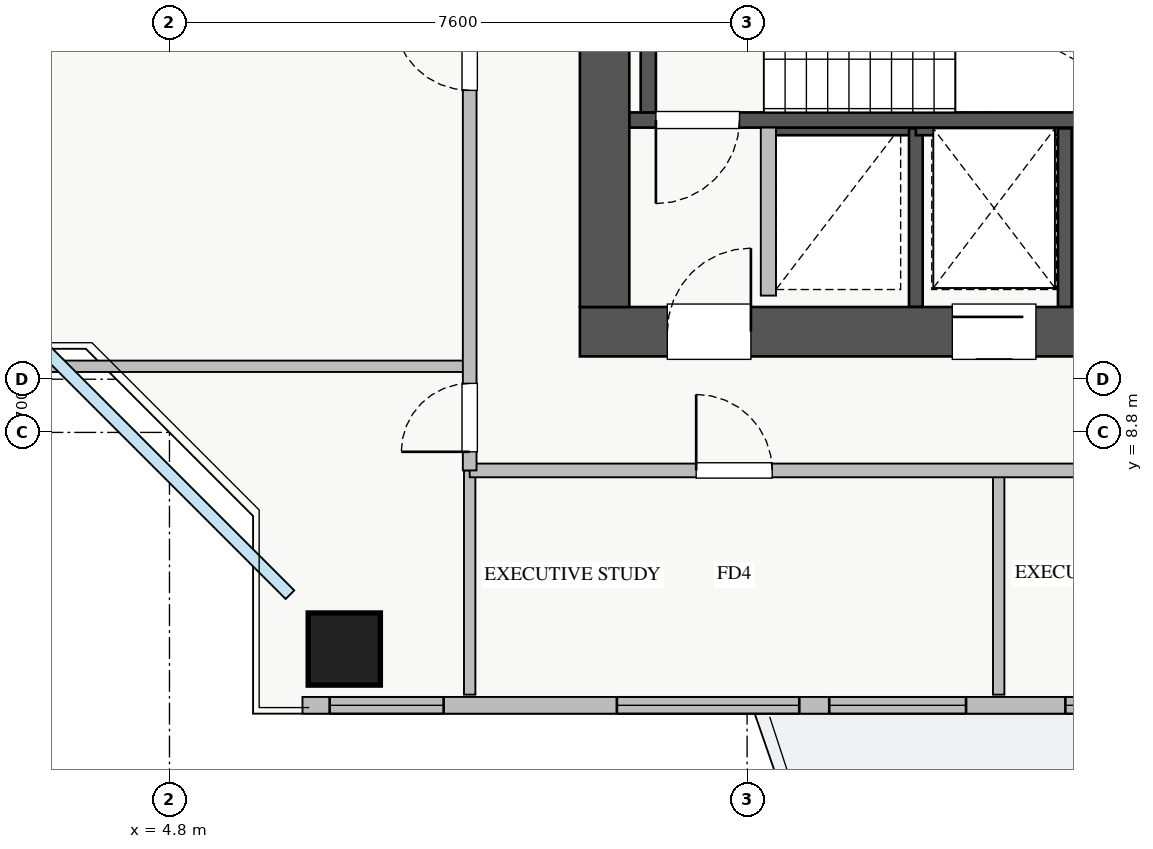
"""IFC4 building model, lengths in metres.
Left out: names, types, materials, properties, quantities, classifications, styles, units other than length and angle.
Written with IfcOpenShell. Run it as: python <this file> out.ifc"""

import sys

from ifc_helpers import new_model, si_unit, direction, frame, frame_2d, origin, origin_2d, place, context, subcontext, project, spatial, rectangle, extrude, source, transform, mapped, element, fill, save


model = new_model("IFC4")
c1 = context("Model", 3, precision=1e-05, world=origin(), true_north=direction((0.0, 1.0)))
c2 = subcontext(c1, "Body", "Model", "MODEL_VIEW")
j1 = project(units=[si_unit("LENGTHUNIT", "METRE"), si_unit("PLANEANGLEUNIT", "RADIAN")], contexts=[c1])
p1 = place(None, origin())
s1 = spatial("IfcSite", under=j1, at=p1, CompositionType="ELEMENT")
p2 = place(p1, origin())
s2 = spatial("IfcBuilding", under=s1, at=p2, CompositionType="ELEMENT")
p3 = place(p2, frame((0.0, 0.0, 147.0)))
s3 = spatial("IfcBuildingStorey", under=s2, at=p3, CompositionType="ELEMENT", Elevation=147.0)
p4 = place(p3, frame((12.68, 12.8, 0.0), z_axis=(0.0, 0.0, 1.0), x_axis=(1.0, 0.0, 0.0)))
e1 = element("IfcWall", 1, at=p4, inside=s3, PredefinedType="SHEAR", context=c2, shape_type="SweptSolid", body=[
    extrude(rectangle(XDim=1.94, YDim=0.18, at=frame_2d((0.97, 0.0))), origin(), (0.0, 0.0, 1.0), 3.07),
])
p5 = place(p3, frame((14.62, 10.45, 0.0), z_axis=(0.0, 0.0, 1.0), x_axis=(0.0, 1.0, 0.0)))
e2 = element("IfcWall", 2, at=p5, inside=s3, PredefinedType="SHEAR", context=c2, shape_type="SweptSolid", body=[
    extrude(rectangle(XDim=2.35, YDim=0.18, at=frame_2d((1.175, 0.0))), origin(), (0.0, 0.0, 1.0), 3.07),
])
p6 = place(p3, frame((14.62, 12.8, 0.0), z_axis=(0.0, 0.0, 1.0), x_axis=(1.0, 0.0, 0.0)))
e3 = element("IfcWall", 3, at=p6, inside=s3, PredefinedType="SHEAR", context=c2, shape_type="SweptSolid", body=[
    extrude(rectangle(XDim=1.96, YDim=0.18, at=frame_2d((0.98, 0.0))), origin(), (0.0, 0.0, 1.0), 3.07),
])
p7 = place(p3, frame((16.58, 10.45, 0.0), z_axis=(0.0, 0.0, 1.0), x_axis=(0.0, 1.0, 0.0)))
e4 = element("IfcWall", 4, at=p7, inside=s3, PredefinedType="SHEAR", context=c2, shape_type="SweptSolid", body=[
    extrude(rectangle(XDim=2.35, YDim=0.18, at=frame_2d((1.175, 0.0))), origin(), (0.0, 0.0, 1.0), 3.07),
])
p8 = place(p3, frame((10.85, 12.91, 0.0), z_axis=(0.0, 0.0, 1.0), x_axis=(1.0, 0.0, 0.0)))
e5 = element("IfcWall", 5, at=p8, inside=s3, PredefinedType="SHEAR", context=c2, shape_type="SweptSolid", body=[
    extrude(rectangle(XDim=7.3, YDim=0.2, at=frame_2d((3.65, 0.0))), origin(), (0.0, 0.0, 1.0), 3.25),
])
p9 = place(p8, frame((0.35, 0.0, 0.0)))
e6 = element("IfcOpeningElement", 6, at=p9, cuts=e5, PredefinedType="OPENING", context=c2, shape_type="SweptSolid", body=[
    extrude(rectangle(XDim=1.1, YDim=2.05, at=frame_2d((0.55, 1.025))), frame((0.0, 0.11, 0.0), z_axis=(0.0, -1.0, 0.0), x_axis=(1.0, 0.0, 0.0)), (0.0, 0.0, 1.0), 0.22),
])
p10 = place(p3, frame((11.1, 13.01, 0.0), z_axis=(0.0, 0.0, 1.0), x_axis=(0.0, 1.0, 0.0)))
e7 = element("IfcWall", 7, at=p10, inside=s3, PredefinedType="SHEAR", context=c2, shape_type="SweptSolid", body=[
    extrude(rectangle(XDim=2.94, YDim=0.2, at=frame_2d((1.47, 0.0))), origin(), (0.0, 0.0, 1.0), 3.25),
])
p11 = place(p3, frame((10.2, 10.125, 0.0), z_axis=(0.0, 0.0, 1.0), x_axis=(1.0, 0.0, 0.0)))
e8 = element("IfcWall", 8, at=p11, inside=s3, PredefinedType="SHEAR", context=c2, shape_type="SweptSolid", body=[
    extrude(rectangle(XDim=17.6, YDim=0.65, at=frame_2d((8.8, 0.0))), origin(), (0.0, 0.0, 1.0), 3.25),
])
p12 = place(p11, frame((1.15, 0.0, 0.0)))
e9 = element("IfcOpeningElement", 9, at=p12, cuts=e8, PredefinedType="OPENING", context=c2, shape_type="SweptSolid", body=[
    extrude(rectangle(XDim=1.1, YDim=2.05, at=frame_2d((0.55, 1.025))), frame((0.0, 0.335, 0.0), z_axis=(0.0, -1.0, 0.0), x_axis=(1.0, 0.0, 0.0)), (0.0, 0.0, 1.0), 0.67),
])
p13 = place(p11, frame((8.3, 0.0, 0.0)))
e10 = element("IfcOpeningElement", 10, at=p13, cuts=e8, PredefinedType="OPENING", context=c2, shape_type="SweptSolid", body=[
    extrude(rectangle(XDim=1.1, YDim=2.05, at=frame_2d((0.55, 1.025))), frame((0.0, 0.335, 0.0), z_axis=(0.0, -1.0, 0.0), x_axis=(1.0, 0.0, 0.0)), (0.0, 0.0, 1.0), 0.67),
])
p14 = place(p11, frame((4.9, 0.0, 0.0)))
e11 = element("IfcOpeningElement", 11, at=p14, cuts=e8, PredefinedType="OPENING", context=c2, shape_type="SweptSolid", body=[
    extrude(rectangle(XDim=1.1, YDim=2.05, at=frame_2d((0.55, 1.025))), frame((0.0, 0.335, 0.0), z_axis=(0.0, -1.0, 0.0), x_axis=(1.0, 0.0, 0.0)), (0.0, 0.0, 1.0), 0.67),
])
p15 = place(p11, frame((14.74, 0.0, 0.0)))
e12 = element("IfcOpeningElement", 12, at=p15, cuts=e8, PredefinedType="OPENING", context=c2, shape_type="SweptSolid", body=[
    extrude(rectangle(XDim=1.0, YDim=2.05, at=frame_2d((0.5, 1.025))), frame((0.0, 0.335, 0.0), z_axis=(0.0, -1.0, 0.0), x_axis=(1.0, 0.0, 0.0)), (0.0, 0.0, 1.0), 0.67),
])
p16 = place(p11, frame((11.67, 0.0, 0.0)))
e13 = element("IfcOpeningElement", 13, at=p16, cuts=e8, PredefinedType="OPENING", context=c2, shape_type="SweptSolid", body=[
    extrude(rectangle(XDim=1.0, YDim=2.05, at=frame_2d((0.5, 1.025))), frame((0.0, 0.335, 0.0), z_axis=(0.0, -1.0, 0.0), x_axis=(1.0, 0.0, 0.0)), (0.0, 0.0, 1.0), 0.67),
])
p17 = place(p3, frame((10.525, 10.45, 0.0), z_axis=(0.0, 0.0, 1.0), x_axis=(0.0, 1.0, 0.0)))
e14 = element("IfcWall", 14, at=p17, inside=s3, PredefinedType="SHEAR", context=c2, shape_type="SweptSolid", body=[
    extrude(rectangle(XDim=5.9, YDim=0.65, at=frame_2d((2.95, 0.0))), origin(), (0.0, 0.0, 1.0), 3.25),
])
m1 = source(origin(), c2, "Body", "SweptSolid", [
    extrude(rectangle(XDim=0.95, YDim=0.95, at=origin_2d()), origin(), (0.0, 0.0, 1.0), 3.25),
])
p18 = place(p3, frame((7.1, 5.95, 0.0), z_axis=(0.0, 0.0, 1.0), x_axis=(1.0, 0.0, 0.0)))
e15 = element("IfcColumn", 15, at=p18, inside=s3, PredefinedType="COLUMN", context=c2, shape_type="MappedRepresentation", body=[
    mapped(m1, transform((0.0, 0.0, 0.0), x_axis=(1.0, 0.0, 0.0), y_axis=(0.0, 1.0, 0.0), z_axis=(0.0, 0.0, 1.0), scale=1.0)),
])
p19 = place(p3, frame((6.55, 5.21, 0.0), z_axis=(0.0, 0.0, 1.0), x_axis=(1.0, 0.0, 0.0)))
e16 = element("IfcWall", 16, at=p19, inside=s3, PredefinedType="STANDARD", context=c2, shape_type="SweptSolid", body=[
    extrude(rectangle(XDim=24.9, YDim=0.22, at=frame_2d((12.45, 0.0))), origin(), (0.0, 0.0, 1.0), 2.61),
])
p20 = place(p19, frame((13.3, 0.0, 0.0)))
e17 = element("IfcOpeningElement", 17, at=p20, cuts=e16, PredefinedType="OPENING", context=c2, shape_type="SweptSolid", body=[
    extrude(rectangle(XDim=1.2, YDim=2.1, at=frame_2d((0.6, 1.05))), frame((0.0, 0.12, 0.0), z_axis=(0.0, -1.0, 0.0), x_axis=(1.0, 0.0, 0.0)), (0.0, 0.0, 1.0), 0.24),
])
p21 = place(p19, frame((0.357, 0.0, 0.9)))
e18 = element("IfcOpeningElement", 18, at=p21, cuts=e16, PredefinedType="OPENING", context=c2, shape_type="SweptSolid", body=[
    extrude(rectangle(XDim=1.5, YDim=1.5, at=frame_2d((0.75, 0.75))), frame((0.0, 0.12, 0.0), z_axis=(0.0, -1.0, 0.0), x_axis=(1.0, 0.0, 0.0)), (0.0, 0.0, 1.0), 0.24),
])
p22 = place(p19, frame((6.931, 0.0, 0.9)))
e19 = element("IfcOpeningElement", 19, at=p22, cuts=e16, PredefinedType="OPENING", context=c2, shape_type="SweptSolid", body=[
    extrude(rectangle(XDim=1.8, YDim=1.5, at=frame_2d((0.9, 0.75))), frame((0.0, 0.12, 0.0), z_axis=(0.0, -1.0, 0.0), x_axis=(1.0, 0.0, 0.0)), (0.0, 0.0, 1.0), 0.24),
])
p23 = place(p19, frame((14.813, 0.0, 0.9)))
e20 = element("IfcOpeningElement", 20, at=p23, cuts=e16, PredefinedType="OPENING", context=c2, shape_type="SweptSolid", body=[
    extrude(rectangle(XDim=1.5, YDim=1.45, at=frame_2d((0.75, 0.725))), frame((0.0, 0.12, 0.0), z_axis=(0.0, -1.0, 0.0), x_axis=(1.0, 0.0, 0.0)), (0.0, 0.0, 1.0), 0.24),
])
p24 = place(p19, frame((20.738, 0.0, 0.9)))
e21 = element("IfcOpeningElement", 21, at=p24, cuts=e16, PredefinedType="OPENING", context=c2, shape_type="SweptSolid", body=[
    extrude(rectangle(XDim=2.1, YDim=1.48, at=frame_2d((1.05, 0.74))), frame((0.0, 0.12, 0.0), z_axis=(0.0, -1.0, 0.0), x_axis=(1.0, 0.0, 0.0)), (0.0, 0.0, 1.0), 0.24),
])
p25 = place(p19, frame((4.136, 0.0, 0.9)))
e22 = element("IfcOpeningElement", 22, at=p25, cuts=e16, PredefinedType="OPENING", context=c2, shape_type="SweptSolid", body=[
    extrude(rectangle(XDim=2.4, YDim=1.5, at=frame_2d((1.2, 0.75))), frame((0.0, 0.12, 0.0), z_axis=(0.0, -1.0, 0.0), x_axis=(1.0, 0.0, 0.0)), (0.0, 0.0, 1.0), 0.24),
])
p26 = place(p19, frame((10.038, 0.0, 0.9)))
e23 = element("IfcOpeningElement", 23, at=p26, cuts=e16, PredefinedType="OPENING", context=c2, shape_type="SweptSolid", body=[
    extrude(rectangle(XDim=2.4, YDim=1.5, at=frame_2d((1.2, 0.75))), frame((0.0, 0.12, 0.0), z_axis=(0.0, -1.0, 0.0), x_axis=(1.0, 0.0, 0.0)), (0.0, 0.0, 1.0), 0.24),
])
p27 = place(p3, frame((12.68, 10.6, 0.0), z_axis=(0.0, 0.0, 1.0), x_axis=(0.0, 1.0, 0.0)))
e24 = element("IfcWall", 24, at=p27, inside=s3, PredefinedType="PARTITIONING", context=c2, shape_type="SweptSolid", body=[
    extrude(rectangle(XDim=2.21, YDim=0.2, at=frame_2d((1.105, 0.0))), origin(), (0.0, 0.0, 1.0), 3.07),
])
p28 = place(p3, frame((15.71, 5.35, 0.0), z_axis=(0.0, 0.0, 1.0), x_axis=(0.0, 1.0, 0.0)))
e25 = element("IfcWall", 25, at=p28, inside=s3, PredefinedType="PARTITIONING", context=c2, shape_type="SweptSolid", body=[
    extrude(rectangle(XDim=2.95, YDim=0.15, at=frame_2d((1.475, 0.0))), origin(), (0.0, 0.0, 1.0), 2.715),
])
p29 = place(p3, frame((8.75, 5.35, 0.0), z_axis=(0.0, 0.0, 1.0), x_axis=(0.0, 1.0, 0.0)))
e26 = element("IfcWall", 26, at=p29, inside=s3, PredefinedType="PARTITIONING", context=c2, shape_type="SweptSolid", body=[
    extrude(rectangle(XDim=2.95, YDim=0.15, at=frame_2d((1.475, 0.0))), origin(), (0.0, 0.0, 1.0), 3.07),
])
p30 = place(p3, frame((8.75, 8.3, 0.0), z_axis=(0.0, 0.0, 1.0), x_axis=(1.0, 0.0, 0.0)))
e27 = element("IfcWall", 27, at=p30, inside=s3, PredefinedType="PARTITIONING", context=c2, shape_type="SweptSolid", body=[
    extrude(rectangle(XDim=23.61, YDim=0.18, at=frame_2d((11.805, 0.0))), origin(), (0.0, 0.0, 1.0), 3.07),
])
p31 = place(p30, frame((2.98, 0.0, 0.0)))
e28 = element("IfcOpeningElement", 28, at=p31, cuts=e27, PredefinedType="OPENING", context=c2, shape_type="SweptSolid", body=[
    extrude(rectangle(XDim=1.0, YDim=2.05, at=frame_2d((0.5, 1.025))), frame((0.0, 0.1, 0.0), z_axis=(0.0, -1.0, 0.0), x_axis=(1.0, 0.0, 0.0)), (0.0, 0.0, 1.0), 0.2),
])
p32 = place(p30, frame((10.725, 0.0, 0.0)))
e29 = element("IfcOpeningElement", 29, at=p32, cuts=e27, PredefinedType="OPENING", context=c2, shape_type="SweptSolid", body=[
    extrude(rectangle(XDim=1.0, YDim=2.05, at=frame_2d((0.5, 1.025))), frame((0.0, 0.1, 0.0), z_axis=(0.0, -1.0, 0.0), x_axis=(1.0, 0.0, 0.0)), (0.0, 0.0, 1.0), 0.2),
])
p33 = place(p30, frame((18.86, 0.0, 0.0)))
e30 = element("IfcOpeningElement", 30, at=p33, cuts=e27, PredefinedType="OPENING", context=c2, shape_type="SweptSolid", body=[
    extrude(rectangle(XDim=1.0, YDim=2.05, at=frame_2d((0.5, 1.025))), frame((0.0, 0.1, 0.0), z_axis=(0.0, -1.0, 0.0), x_axis=(1.0, 0.0, 0.0)), (0.0, 0.0, 1.0), 0.2),
])
p34 = place(p3, frame((1.35, 9.67, 0.0), z_axis=(0.0, 0.0, 1.0), x_axis=(1.0, 0.0, 0.0)))
e31 = element("IfcWall", 31, at=p34, inside=s3, PredefinedType="PARTITIONING", context=c2, shape_type="SweptSolid", body=[
    extrude(rectangle(XDim=7.4, YDim=0.15, at=frame_2d((3.7, 0.0))), origin(), (0.0, 0.0, 1.0), 3.07),
])
p35 = place(p3, frame((8.75, 8.3, 0.0), z_axis=(0.0, 0.0, 1.0), x_axis=(0.0, 1.0, 0.0)))
e32 = element("IfcWall", 32, at=p35, inside=s3, PredefinedType="PARTITIONING", context=c2, shape_type="SweptSolid", body=[
    extrude(rectangle(XDim=29.4, YDim=0.18, at=frame_2d((14.7, 0.0))), origin(), (0.0, 0.0, 1.0), 3.07),
])
p36 = place(p35, frame((28.08, 0.0, 0.0)))
e33 = element("IfcOpeningElement", 33, at=p36, cuts=e32, PredefinedType="OPENING", context=c2, shape_type="SweptSolid", body=[
    extrude(rectangle(XDim=0.9, YDim=2.05, at=frame_2d((0.45, 1.025))), frame((0.0, 0.1, 0.0), z_axis=(0.0, -1.0, 0.0), x_axis=(1.0, 0.0, 0.0)), (0.0, 0.0, 1.0), 0.2),
])
p37 = place(p35, frame((0.245, 0.0, 0.0)))
e34 = element("IfcOpeningElement", 34, at=p37, cuts=e32, PredefinedType="OPENING", context=c2, shape_type="SweptSolid", body=[
    extrude(rectangle(XDim=0.9, YDim=2.05, at=frame_2d((0.45, 1.025))), frame((0.0, 0.1, 0.0), z_axis=(0.0, -1.0, 0.0), x_axis=(1.0, 0.0, 0.0)), (0.0, 0.0, 1.0), 0.2),
])
p38 = place(p35, frame((5.0, 0.0, 0.0)))
e35 = element("IfcOpeningElement", 35, at=p38, cuts=e32, PredefinedType="OPENING", context=c2, shape_type="SweptSolid", body=[
    extrude(rectangle(XDim=1.0, YDim=2.05, at=frame_2d((0.5, 1.025))), frame((0.0, 0.1, 0.0), z_axis=(0.0, -1.0, 0.0), x_axis=(1.0, 0.0, 0.0)), (0.0, 0.0, 1.0), 0.2),
])
p39 = place(p35, frame((11.165, 0.0, 0.0)))
e36 = element("IfcOpeningElement", 36, at=p39, cuts=e32, PredefinedType="OPENING", context=c2, shape_type="SweptSolid", body=[
    extrude(rectangle(XDim=1.0, YDim=2.05, at=frame_2d((0.5, 1.025))), frame((0.0, 0.1, 0.0), z_axis=(0.0, -1.0, 0.0), x_axis=(1.0, 0.0, 0.0)), (0.0, 0.0, 1.0), 0.2),
])
p40 = place(p35, frame((20.325, 0.0, 0.0)))
e37 = element("IfcOpeningElement", 37, at=p40, cuts=e32, PredefinedType="OPENING", context=c2, shape_type="SweptSolid", body=[
    extrude(rectangle(XDim=1.0, YDim=2.05, at=frame_2d((0.5, 1.025))), frame((0.0, 0.1, 0.0), z_axis=(0.0, -1.0, 0.0), x_axis=(1.0, 0.0, 0.0)), (0.0, 0.0, 1.0), 0.2),
])
m2 = source(origin(), c2, "Body", "SweptSolid", [
    extrude(rectangle(XDim=1.5, YDim=1.5, at=frame_2d((0.75, 0.75))), frame((0.0, 0.03, 0.0), z_axis=(0.0, -1.0, 0.0), x_axis=(1.0, 0.0, 0.0)), (0.0, 0.0, 1.0), 0.06),
])
p41 = place(p21, origin())
e38 = element("IfcWindow", 38, at=p41, inside=s3, PartitioningType="TRIPLE_PANEL_VERTICAL", PredefinedType="WINDOW", context=c2, shape_type="MappedRepresentation", body=[
    mapped(m2, transform((0.0, 0.0, 0.0), x_axis=(1.0, 0.0, 0.0), y_axis=(0.0, 1.0, 0.0), z_axis=(0.0, 0.0, 1.0), scale=1.0)),
])
fill(e18, e38)
m3 = source(origin(), c2, "Body", "SweptSolid", [
    extrude(rectangle(XDim=1.8, YDim=1.5, at=frame_2d((0.9, 0.75))), frame((0.0, 0.03, 0.0), z_axis=(0.0, -1.0, 0.0), x_axis=(1.0, 0.0, 0.0)), (0.0, 0.0, 1.0), 0.06),
])
p42 = place(p22, origin())
e39 = element("IfcWindow", 39, at=p42, inside=s3, PartitioningType="DOUBLE_PANEL_VERTICAL", PredefinedType="WINDOW", context=c2, shape_type="MappedRepresentation", body=[
    mapped(m3, transform((0.0, 0.0, 0.0), x_axis=(1.0, 0.0, 0.0), y_axis=(0.0, 1.0, 0.0), z_axis=(0.0, 0.0, 1.0), scale=1.0)),
])
fill(e19, e39)
m4 = source(origin(), c2, "Body", "SweptSolid", [
    extrude(rectangle(XDim=1.1, YDim=2.05, at=frame_2d((0.55, 1.025))), frame((0.0, 0.025, 0.0), z_axis=(0.0, -1.0, 0.0), x_axis=(1.0, 0.0, 0.0)), (0.0, 0.0, 1.0), 0.05),
])
p43 = place(p12, origin())
e40 = element("IfcDoor", 40, at=p43, inside=s3, OperationType="SINGLE_SWING_RIGHT", PredefinedType="DOOR", context=c2, shape_type="MappedRepresentation", body=[
    mapped(m4, transform((0.0, 0.0, 0.0), x_axis=(1.0, 0.0, 0.0), y_axis=(0.0, 1.0, 0.0), z_axis=(0.0, 0.0, 1.0), scale=1.0)),
])
fill(e9, e40)
p44 = place(p9, frame((1.1, 0.0, 0.0), z_axis=(0.0, 0.0, 1.0), x_axis=(-1.0, 0.0, 0.0)))
e41 = element("IfcDoor", 41, at=p44, inside=s3, OperationType="SINGLE_SWING_LEFT", PredefinedType="DOOR", context=c2, shape_type="MappedRepresentation", body=[
    mapped(m4, transform((0.0, 0.0, 0.0), x_axis=(1.0, 0.0, 0.0), y_axis=(0.0, 1.0, 0.0), z_axis=(0.0, 0.0, 1.0), scale=1.0)),
])
fill(e6, e41)
p45 = place(p14, origin())
e42 = element("IfcDoor", 42, at=p45, inside=s3, OperationType="SLIDING_TO_RIGHT", PredefinedType="DOOR", context=c2, shape_type="MappedRepresentation", body=[
    mapped(m4, transform((0.0, 0.0, 0.0), x_axis=(1.0, 0.0, 0.0), y_axis=(0.0, 1.0, 0.0), z_axis=(0.0, 0.0, 1.0), scale=1.0)),
])
fill(e11, e42)
m5 = source(origin(), c2, "Body", "SweptSolid", [
    extrude(rectangle(XDim=1.0, YDim=2.05, at=frame_2d((0.5, 1.025))), frame((0.0, 0.025, 0.0), z_axis=(0.0, -1.0, 0.0), x_axis=(1.0, 0.0, 0.0)), (0.0, 0.0, 1.0), 0.05),
])
p46 = place(p31, origin())
e43 = element("IfcDoor", 43, at=p46, inside=s3, OperationType="SINGLE_SWING_LEFT", PredefinedType="DOOR", context=c2, shape_type="MappedRepresentation", body=[
    mapped(m5, transform((0.0, 0.0, 0.0), x_axis=(1.0, 0.0, 0.0), y_axis=(0.0, 1.0, 0.0), z_axis=(0.0, 0.0, 1.0), scale=1.0)),
])
fill(e28, e43)
m6 = source(origin(), c2, "Body", "SweptSolid", [
    extrude(rectangle(XDim=0.9, YDim=2.05, at=frame_2d((0.45, 1.025))), frame((0.0, 0.025, 0.0), z_axis=(0.0, -1.0, 0.0), x_axis=(1.0, 0.0, 0.0)), (0.0, 0.0, 1.0), 0.05),
])
p47 = place(p37, origin())
e44 = element("IfcDoor", 44, at=p47, inside=s3, OperationType="SINGLE_SWING_LEFT", PredefinedType="DOOR", context=c2, shape_type="MappedRepresentation", body=[
    mapped(m6, transform((0.0, 0.0, 0.0), x_axis=(1.0, 0.0, 0.0), y_axis=(0.0, 1.0, 0.0), z_axis=(0.0, 0.0, 1.0), scale=1.0)),
])
fill(e34, e44)
p48 = place(p38, origin())
e45 = element("IfcDoor", 45, at=p48, inside=s3, OperationType="SINGLE_SWING_RIGHT", PredefinedType="DOOR", context=c2, shape_type="MappedRepresentation", body=[
    mapped(m5, transform((0.0, 0.0, 0.0), x_axis=(1.0, 0.0, 0.0), y_axis=(0.0, 1.0, 0.0), z_axis=(0.0, 0.0, 1.0), scale=1.0)),
])
fill(e35, e45)
m7 = source(origin(), c2, "Body", "SweptSolid", [
    extrude(rectangle(XDim=2.4, YDim=1.5, at=frame_2d((1.2, 0.75))), frame((0.0, 0.03, 0.0), z_axis=(0.0, -1.0, 0.0), x_axis=(1.0, 0.0, 0.0)), (0.0, 0.0, 1.0), 0.06),
])
p49 = place(p25, origin())
e46 = element("IfcWindow", 46, at=p49, inside=s3, PartitioningType="TRIPLE_PANEL_VERTICAL", PredefinedType="WINDOW", context=c2, shape_type="MappedRepresentation", body=[
    mapped(m7, transform((0.0, 0.0, 0.0), x_axis=(1.0, 0.0, 0.0), y_axis=(0.0, 1.0, 0.0), z_axis=(0.0, 0.0, 1.0), scale=1.0)),
])
fill(e22, e46)
p50 = place(p26, origin())
e47 = element("IfcWindow", 47, at=p50, inside=s3, PartitioningType="TRIPLE_PANEL_VERTICAL", PredefinedType="WINDOW", context=c2, shape_type="MappedRepresentation", body=[
    mapped(m7, transform((0.0, 0.0, 0.0), x_axis=(1.0, 0.0, 0.0), y_axis=(0.0, 1.0, 0.0), z_axis=(0.0, 0.0, 1.0), scale=1.0)),
])
fill(e23, e47)
save(model, sys.argv[1])
